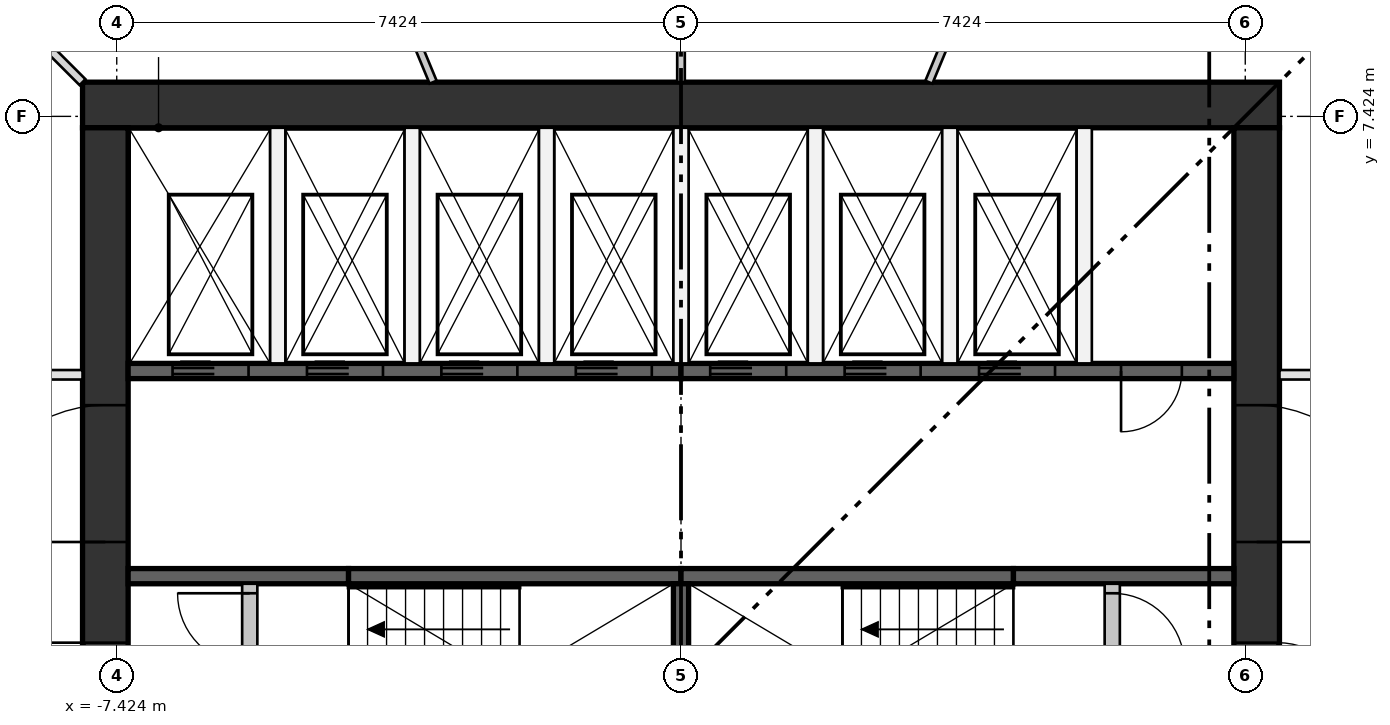
"""IFC4 building model, lengths in metres.
Left out: names, types, materials, properties, quantities, classifications, styles, units other than length and angle.
Written with IfcOpenShell. Run it as: python <this file> out.ifc"""

import sys

from ifc_helpers import new_model, si_unit, direction, frame, frame_2d, origin, place, context, subcontext, project, spatial, rectangle, extrude, element, fill, save


model = new_model("IFC4")
c1 = context("Model", 3, precision=1e-05, world=origin(), true_north=direction((0.0, 1.0)))
c2 = subcontext(c1, "Body", "Model", "MODEL_VIEW")
j1 = project(units=[si_unit("LENGTHUNIT", "METRE"), si_unit("PLANEANGLEUNIT", "RADIAN")], contexts=[c1])
p1 = place(None, origin())
s1 = spatial("IfcSite", under=j1, at=p1, CompositionType="ELEMENT")
p2 = place(p1, origin())
s2 = spatial("IfcBuilding", under=s1, at=p2, CompositionType="ELEMENT")
p3 = place(p2, frame((0.0, 0.0, 127.65)))
s3 = spatial("IfcBuildingStorey", under=s2, at=p3, CompositionType="ELEMENT", Elevation=127.65)
p4 = place(p3, frame((-7.874, 7.574, 0.0), z_axis=(0.0, 0.0, 1.0), x_axis=(1.0, 0.0, 0.0)))
e1 = element("IfcWall", 1, at=p4, inside=s3, PredefinedType="SHEAR", context=c2, shape_type="SweptSolid", body=[
    extrude(rectangle(XDim=15.748, YDim=0.6, at=frame_2d((7.874, 0.0))), origin(), (0.0, 0.0, 1.0), 3.35),
])
p5 = place(p3, frame((-7.574, -7.274, 0.0), z_axis=(0.0, 0.0, 1.0), x_axis=(0.0, 1.0, 0.0)))
e2 = element("IfcWall", 2, at=p5, inside=s3, PredefinedType="SHEAR", context=c2, shape_type="SweptSolid", body=[
    extrude(rectangle(XDim=14.548, YDim=0.6, at=frame_2d((7.274, 0.0))), origin(), (0.0, 0.0, 1.0), 3.35),
])
p6 = place(p5, frame((6.774, 0.0, 0.0)))
e3 = element("IfcOpeningElement", 3, at=p6, cuts=e2, PredefinedType="OPENING", context=c2, shape_type="SweptSolid", body=[
    extrude(rectangle(XDim=1.0, YDim=2.1, at=frame_2d((0.5, 1.05))), frame((0.0, 0.31, 0.0), z_axis=(0.0, -1.0, 0.0), x_axis=(1.0, 0.0, 0.0)), (0.0, 0.0, 1.0), 0.62),
])
p7 = place(p5, frame((3.649, 0.0, 0.0)))
e4 = element("IfcOpeningElement", 4, at=p7, cuts=e2, PredefinedType="OPENING", context=c2, shape_type="SweptSolid", body=[
    extrude(rectangle(XDim=1.8, YDim=2.1, at=frame_2d((0.9, 1.05))), frame((0.0, 0.31, 0.0), z_axis=(0.0, -1.0, 0.0), x_axis=(1.0, 0.0, 0.0)), (0.0, 0.0, 1.0), 0.62),
])
p8 = place(p5, frame((9.098, 0.0, 0.0)))
e5 = element("IfcOpeningElement", 5, at=p8, cuts=e2, PredefinedType="OPENING", context=c2, shape_type="SweptSolid", body=[
    extrude(rectangle(XDim=1.8, YDim=2.1, at=frame_2d((0.9, 1.05))), frame((0.0, 0.31, 0.0), z_axis=(0.0, -1.0, 0.0), x_axis=(1.0, 0.0, 0.0)), (0.0, 0.0, 1.0), 0.62),
])
p9 = place(p3, frame((7.574, -7.274, 0.0), z_axis=(0.0, 0.0, 1.0), x_axis=(0.0, 1.0, 0.0)))
e6 = element("IfcWall", 6, at=p9, inside=s3, PredefinedType="SHEAR", context=c2, shape_type="SweptSolid", body=[
    extrude(rectangle(XDim=14.548, YDim=0.6, at=frame_2d((7.274, 0.0))), origin(), (0.0, 0.0, 1.0), 3.35),
])
p10 = place(p9, frame((6.774, 0.0, 0.0)))
e7 = element("IfcOpeningElement", 7, at=p10, cuts=e6, PredefinedType="OPENING", context=c2, shape_type="SweptSolid", body=[
    extrude(rectangle(XDim=1.0, YDim=2.1, at=frame_2d((0.5, 1.05))), frame((0.0, 0.31, 0.0), z_axis=(0.0, -1.0, 0.0), x_axis=(1.0, 0.0, 0.0)), (0.0, 0.0, 1.0), 0.62),
])
p11 = place(p9, frame((3.649, 0.0, 0.0)))
e8 = element("IfcOpeningElement", 8, at=p11, cuts=e6, PredefinedType="OPENING", context=c2, shape_type="SweptSolid", body=[
    extrude(rectangle(XDim=1.8, YDim=2.1, at=frame_2d((0.9, 1.05))), frame((0.0, 0.31, 0.0), z_axis=(0.0, -1.0, 0.0), x_axis=(1.0, 0.0, 0.0)), (0.0, 0.0, 1.0), 0.62),
])
p12 = place(p9, frame((9.098, 0.0, 0.0)))
e9 = element("IfcOpeningElement", 9, at=p12, cuts=e6, PredefinedType="OPENING", context=c2, shape_type="SweptSolid", body=[
    extrude(rectangle(XDim=1.8, YDim=2.1, at=frame_2d((0.9, 1.05))), frame((0.0, 0.31, 0.0), z_axis=(0.0, -1.0, 0.0), x_axis=(1.0, 0.0, 0.0)), (0.0, 0.0, 1.0), 0.62),
])
p13 = place(p3, frame((-7.274, 4.074, 0.0), z_axis=(0.0, 0.0, 1.0), x_axis=(1.0, 0.0, 0.0)))
e10 = element("IfcWall", 10, at=p13, inside=s3, PredefinedType="SHEAR", context=c2, shape_type="SweptSolid", body=[
    extrude(rectangle(XDim=7.274, YDim=0.2, at=frame_2d((3.637, 0.0))), origin(), (0.0, 0.0, 1.0), 3.0),
])
p14 = place(p13, frame((0.584, 0.0, 0.0)))
e11 = element("IfcOpeningElement", 11, at=p14, cuts=e10, PredefinedType="OPENING", context=c2, shape_type="SweptSolid", body=[
    extrude(rectangle(XDim=1.0, YDim=2.1, at=frame_2d((0.5, 1.05))), frame((0.0, 0.11, 0.0), z_axis=(0.0, -1.0, 0.0), x_axis=(1.0, 0.0, 0.0)), (0.0, 0.0, 1.0), 0.22),
])
p15 = place(p13, frame((2.353, 0.0, 0.0)))
e12 = element("IfcOpeningElement", 12, at=p15, cuts=e10, PredefinedType="OPENING", context=c2, shape_type="SweptSolid", body=[
    extrude(rectangle(XDim=1.0, YDim=2.1, at=frame_2d((0.5, 1.05))), frame((0.0, 0.11, 0.0), z_axis=(0.0, -1.0, 0.0), x_axis=(1.0, 0.0, 0.0)), (0.0, 0.0, 1.0), 0.22),
])
p16 = place(p13, frame((4.121, 0.0, 0.0)))
e13 = element("IfcOpeningElement", 13, at=p16, cuts=e10, PredefinedType="OPENING", context=c2, shape_type="SweptSolid", body=[
    extrude(rectangle(XDim=1.0, YDim=2.1, at=frame_2d((0.5, 1.05))), frame((0.0, 0.11, 0.0), z_axis=(0.0, -1.0, 0.0), x_axis=(1.0, 0.0, 0.0)), (0.0, 0.0, 1.0), 0.22),
])
p17 = place(p13, frame((5.89, 0.0, 0.0)))
e14 = element("IfcOpeningElement", 14, at=p17, cuts=e10, PredefinedType="OPENING", context=c2, shape_type="SweptSolid", body=[
    extrude(rectangle(XDim=1.0, YDim=2.1, at=frame_2d((0.5, 1.05))), frame((0.0, 0.11, 0.0), z_axis=(0.0, -1.0, 0.0), x_axis=(1.0, 0.0, 0.0)), (0.0, 0.0, 1.0), 0.22),
])
p18 = place(p3, frame((0.0, 4.074, 0.0), z_axis=(0.0, 0.0, 1.0), x_axis=(1.0, 0.0, 0.0)))
e15 = element("IfcWall", 15, at=p18, inside=s3, PredefinedType="SHEAR", context=c2, shape_type="SweptSolid", body=[
    extrude(rectangle(XDim=7.274, YDim=0.2, at=frame_2d((3.637, 0.0))), origin(), (0.0, 0.0, 1.0), 3.0),
])
p19 = place(p18, frame((0.384, 0.0, 0.0)))
e16 = element("IfcOpeningElement", 16, at=p19, cuts=e15, PredefinedType="OPENING", context=c2, shape_type="SweptSolid", body=[
    extrude(rectangle(XDim=1.0, YDim=2.1, at=frame_2d((0.5, 1.05))), frame((0.0, 0.11, 0.0), z_axis=(0.0, -1.0, 0.0), x_axis=(1.0, 0.0, 0.0)), (0.0, 0.0, 1.0), 0.22),
])
p20 = place(p18, frame((2.153, 0.0, 0.0)))
e17 = element("IfcOpeningElement", 17, at=p20, cuts=e15, PredefinedType="OPENING", context=c2, shape_type="SweptSolid", body=[
    extrude(rectangle(XDim=1.0, YDim=2.1, at=frame_2d((0.5, 1.05))), frame((0.0, 0.11, 0.0), z_axis=(0.0, -1.0, 0.0), x_axis=(1.0, 0.0, 0.0)), (0.0, 0.0, 1.0), 0.22),
])
p21 = place(p18, frame((3.921, 0.0, 0.0)))
e18 = element("IfcOpeningElement", 18, at=p21, cuts=e15, PredefinedType="OPENING", context=c2, shape_type="SweptSolid", body=[
    extrude(rectangle(XDim=1.0, YDim=2.1, at=frame_2d((0.5, 1.05))), frame((0.0, 0.11, 0.0), z_axis=(0.0, -1.0, 0.0), x_axis=(1.0, 0.0, 0.0)), (0.0, 0.0, 1.0), 0.22),
])
p22 = place(p18, frame((5.79, 0.0, 0.0)))
e19 = element("IfcOpeningElement", 19, at=p22, cuts=e15, PredefinedType="OPENING", context=c2, shape_type="SweptSolid", body=[
    extrude(rectangle(XDim=0.8, YDim=2.1, at=frame_2d((0.4, 1.05))), frame((0.0, 0.11, 0.0), z_axis=(0.0, -1.0, 0.0), x_axis=(1.0, 0.0, 0.0)), (0.0, 0.0, 1.0), 0.22),
])
p23 = place(p3, frame((-7.274, 1.375, 0.0), z_axis=(0.0, 0.0, 1.0), x_axis=(1.0, 0.0, 0.0)))
e20 = element("IfcWall", 20, at=p23, inside=s3, PredefinedType="SHEAR", context=c2, shape_type="SweptSolid", body=[
    extrude(rectangle(XDim=2.9, YDim=0.2, at=frame_2d((1.45, 0.0))), origin(), (0.0, 0.0, 1.0), 3.0),
])
for number, where, z_axis, x_axis in (
    (21, (-4.374, 1.375, 0.0), (0.0, 0.0, 1.0), (1.0, 0.0, 0.0)),
    (22, (0.0, 1.375, 0.0), (0.0, 0.0, 1.0), (1.0, 0.0, 0.0)),
):
    element("IfcWall", number, at=place(p3, frame(where, z_axis=z_axis, x_axis=x_axis)), inside=s3, PredefinedType="SHEAR", context=c2, shape_type="SweptSolid", body=[
        extrude(rectangle(XDim=4.374, YDim=0.2, at=frame_2d((2.187, 0.0))), origin(), (0.0, 0.0, 1.0), 3.0),
    ])
p24 = place(p3, frame((4.374, 1.375, 0.0), z_axis=(0.0, 0.0, 1.0), x_axis=(1.0, 0.0, 0.0)))
e23 = element("IfcWall", 23, at=p24, inside=s3, PredefinedType="SHEAR", context=c2, shape_type="SweptSolid", body=[
    extrude(rectangle(XDim=2.9, YDim=0.2, at=frame_2d((1.45, 0.0))), origin(), (0.0, 0.0, 1.0), 3.0),
])
p25 = place(p3, frame((0.0, -1.275, 0.0), z_axis=(0.0, 0.0, 1.0), x_axis=(0.0, 1.0, 0.0)))
e24 = element("IfcWall", 24, at=p25, inside=s3, PredefinedType="SHEAR", context=c2, shape_type="SweptSolid", body=[
    extrude(rectangle(XDim=2.55, YDim=0.2, at=frame_2d((1.275, 0.0))), origin(), (0.0, 0.0, 1.0), 3.0),
])
for number, where, z_axis, x_axis in (
    (25, (-5.305, 4.174, 0.0), (0.0, 0.0, 1.0), (0.0, 1.0, 0.0)),
    (26, (-3.537, 4.174, 0.0), (0.0, 0.0, 1.0), (0.0, 1.0, 0.0)),
    (27, (-1.769, 4.174, 0.0), (0.0, 0.0, 1.0), (0.0, 1.0, 0.0)),
    (28, (0.0, 4.174, 0.0), (0.0, 0.0, 1.0), (0.0, 1.0, 0.0)),
    (29, (1.769, 4.174, 0.0), (0.0, 0.0, 1.0), (0.0, 1.0, 0.0)),
    (30, (3.537, 4.174, 0.0), (0.0, 0.0, 1.0), (0.0, 1.0, 0.0)),
    (31, (5.305, 4.174, 0.0), (0.0, 0.0, 1.0), (0.0, 1.0, 0.0)),
):
    element("IfcWall", number, at=place(p3, frame(where, z_axis=z_axis, x_axis=x_axis)), inside=s3, PredefinedType="PARTITIONING", context=c2, shape_type="SweptSolid", body=[
        extrude(rectangle(XDim=3.1, YDim=0.2, at=frame_2d((1.55, 0.0))), origin(), (0.0, 0.0, 1.0), 3.0),
    ])
p26 = place(p3, frame((-5.674, -1.275, 0.0), z_axis=(0.0, 0.0, 1.0), x_axis=(0.0, 1.0, 0.0)))
e32 = element("IfcWall", 32, at=p26, inside=s3, PredefinedType="PARTITIONING", context=c2, shape_type="SweptSolid", body=[
    extrude(rectangle(XDim=2.55, YDim=0.2, at=frame_2d((1.275, 0.0))), origin(), (0.0, 0.0, 1.0), 3.0),
])
p27 = place(p26, frame((0.125, 0.0, 0.0)))
e33 = element("IfcOpeningElement", 33, at=p27, cuts=e32, PredefinedType="OPENING", context=c2, shape_type="SweptSolid", body=[
    extrude(rectangle(XDim=0.95, YDim=2.1, at=frame_2d((0.475, 1.05))), frame((0.0, 0.11, 0.0), z_axis=(0.0, -1.0, 0.0), x_axis=(1.0, 0.0, 0.0)), (0.0, 0.0, 1.0), 0.22),
])
p28 = place(p26, frame((1.475, 0.0, 0.0)))
e34 = element("IfcOpeningElement", 34, at=p28, cuts=e32, PredefinedType="OPENING", context=c2, shape_type="SweptSolid", body=[
    extrude(rectangle(XDim=0.95, YDim=2.1, at=frame_2d((0.475, 1.05))), frame((0.0, 0.11, 0.0), z_axis=(0.0, -1.0, 0.0), x_axis=(1.0, 0.0, 0.0)), (0.0, 0.0, 1.0), 0.22),
])
p29 = place(p3, frame((5.674, -1.275, 0.0), z_axis=(0.0, 0.0, 1.0), x_axis=(0.0, 1.0, 0.0)))
e35 = element("IfcWall", 35, at=p29, inside=s3, PredefinedType="PARTITIONING", context=c2, shape_type="SweptSolid", body=[
    extrude(rectangle(XDim=2.55, YDim=0.2, at=frame_2d((1.275, 0.0))), origin(), (0.0, 0.0, 1.0), 3.0),
])
p30 = place(p29, frame((0.125, 0.0, 0.0)))
e36 = element("IfcOpeningElement", 36, at=p30, cuts=e35, PredefinedType="OPENING", context=c2, shape_type="SweptSolid", body=[
    extrude(rectangle(XDim=0.95, YDim=2.1, at=frame_2d((0.475, 1.05))), frame((0.0, 0.11, 0.0), z_axis=(0.0, -1.0, 0.0), x_axis=(1.0, 0.0, 0.0)), (0.0, 0.0, 1.0), 0.22),
])
p31 = place(p29, frame((1.475, 0.0, 0.0)))
e37 = element("IfcOpeningElement", 37, at=p31, cuts=e35, PredefinedType="OPENING", context=c2, shape_type="SweptSolid", body=[
    extrude(rectangle(XDim=0.95, YDim=2.1, at=frame_2d((0.475, 1.05))), frame((0.0, 0.11, 0.0), z_axis=(0.0, -1.0, 0.0), x_axis=(1.0, 0.0, 0.0)), (0.0, 0.0, 1.0), 0.22),
])
p32 = place(p3, frame((7.874, 4.024, 0.0), z_axis=(0.0, 0.0, 1.0), x_axis=(1.0, 0.0, 0.0)))
e38 = element("IfcWall", 38, at=p32, inside=s3, PredefinedType="PARTITIONING", context=c2, shape_type="SweptSolid", body=[
    extrude(rectangle(XDim=5.384, YDim=0.125, at=frame_2d((2.692, 0.0))), origin(), (0.0, 0.0, 1.0), 3.0),
])
p33 = place(p32, frame((1.8, 0.0, 0.0)))
e39 = element("IfcOpeningElement", 39, at=p33, cuts=e38, PredefinedType="OPENING", context=c2, shape_type="SweptSolid", body=[
    extrude(rectangle(XDim=1.8, YDim=2.1, at=frame_2d((0.9, 1.05))), frame((0.0, 0.073, 0.0), z_axis=(0.0, -1.0, 0.0), x_axis=(1.0, 0.0, 0.0)), (0.0, 0.0, 1.0), 0.145),
])
p34 = place(p3, frame((-13.784, 4.024, 0.0), z_axis=(0.0, 0.0, 1.0), x_axis=(1.0, 0.0, 0.0)))
e40 = element("IfcWall", 40, at=p34, inside=s3, PredefinedType="PARTITIONING", context=c2, shape_type="SweptSolid", body=[
    extrude(rectangle(XDim=5.91, YDim=0.125, at=frame_2d((2.955, 0.0))), origin(), (0.0, 0.0, 1.0), 3.0),
])
p35 = place(p34, frame((2.5, 0.0, 0.0)))
e41 = element("IfcOpeningElement", 41, at=p35, cuts=e40, PredefinedType="OPENING", context=c2, shape_type="SweptSolid", body=[
    extrude(rectangle(XDim=1.0, YDim=2.1, at=frame_2d((0.5, 1.05))), frame((0.0, 0.073, 0.0), z_axis=(0.0, -1.0, 0.0), x_axis=(1.0, 0.0, 0.0)), (0.0, 0.0, 1.0), 0.145),
])
p36 = place(p3, frame((3.261, 7.874, 0.0), z_axis=(0.0, 0.0, 1.0), x_axis=(0.382689326263, 0.923877091157, 0.0)))
e42 = element("IfcWall", 42, at=p36, inside=s3, PredefinedType="PARTITIONING", context=c2, shape_type="SweptSolid", body=[
    extrude(rectangle(XDim=6.537, YDim=0.1, at=frame_2d((3.269, 0.0))), origin(), (0.0, 0.0, 1.0), 3.0),
])
p37 = place(p36, frame((2.8, 0.0, 0.0)))
e43 = element("IfcOpeningElement", 43, at=p37, cuts=e42, PredefinedType="OPENING", context=c2, shape_type="SweptSolid", body=[
    extrude(rectangle(XDim=1.0, YDim=2.1, at=frame_2d((0.5, 1.05))), frame((0.0, 0.06, 0.0), z_axis=(0.0, -1.0, 0.0), x_axis=(1.0, 0.0, 0.0)), (0.0, 0.0, 1.0), 0.12),
])
p38 = place(p3, frame((0.0, 7.874, 0.0), z_axis=(0.0, 0.0, 1.0), x_axis=(0.0, 1.0, 0.0)))
e44 = element("IfcWall", 44, at=p38, inside=s3, PredefinedType="PARTITIONING", context=c2, shape_type="SweptSolid", body=[
    extrude(rectangle(XDim=7.186, YDim=0.1, at=frame_2d((3.593, 0.0))), origin(), (0.0, 0.0, 1.0), 3.0),
])
p39 = place(p38, frame((3.1, 0.0, 0.0)))
e45 = element("IfcOpeningElement", 45, at=p39, cuts=e44, PredefinedType="OPENING", context=c2, shape_type="SweptSolid", body=[
    extrude(rectangle(XDim=1.0, YDim=2.1, at=frame_2d((0.5, 1.05))), frame((0.0, 0.06, 0.0), z_axis=(0.0, -1.0, 0.0), x_axis=(1.0, 0.0, 0.0)), (0.0, 0.0, 1.0), 0.12),
])
p40 = place(p3, frame((-3.261, 7.874, 0.0), z_axis=(0.0, 0.0, 1.0), x_axis=(-0.382689326263, 0.923877091157, 0.0)))
e46 = element("IfcWall", 46, at=p40, inside=s3, PredefinedType="PARTITIONING", context=c2, shape_type="SweptSolid", body=[
    extrude(rectangle(XDim=6.537, YDim=0.1, at=frame_2d((3.269, 0.0))), origin(), (0.0, 0.0, 1.0), 3.0),
])
p41 = place(p40, frame((2.8, 0.0, 0.0)))
e47 = element("IfcOpeningElement", 47, at=p41, cuts=e46, PredefinedType="OPENING", context=c2, shape_type="SweptSolid", body=[
    extrude(rectangle(XDim=1.0, YDim=2.1, at=frame_2d((0.5, 1.05))), frame((0.0, 0.06, 0.0), z_axis=(0.0, -1.0, 0.0), x_axis=(1.0, 0.0, 0.0)), (0.0, 0.0, 1.0), 0.12),
])
p42 = place(p3, frame((-7.874, 7.874, 0.0), z_axis=(0.0, 0.0, 1.0), x_axis=(-0.707106781187, 0.707106781187, 0.0)))
e48 = element("IfcWall", 48, at=p42, inside=s3, PredefinedType="PARTITIONING", context=c2, shape_type="SweptSolid", body=[
    extrude(rectangle(XDim=6.794, YDim=0.11, at=frame_2d((3.397, 0.0))), origin(), (0.0, 0.0, 1.0), 3.0),
])
p43 = place(p14, frame((1.0, 0.0, 0.0), z_axis=(0.0, 0.0, 1.0), x_axis=(-1.0, 0.0, 0.0)))
e49 = element("IfcDoor", 49, at=p43, inside=s3, OperationType="DOUBLE_DOOR_SLIDING", PredefinedType="DOOR", context=c2, shape_type="SweptSolid", body=[
    extrude(rectangle(XDim=1.0, YDim=2.1, at=frame_2d((0.5, 1.05))), frame((0.0, 0.025, 0.0), z_axis=(0.0, -1.0, 0.0), x_axis=(1.0, 0.0, 0.0)), (0.0, 0.0, 1.0), 0.05),
])
fill(e11, e49)
p44 = place(p15, frame((1.0, 0.0, 0.0), z_axis=(0.0, 0.0, 1.0), x_axis=(-1.0, 0.0, 0.0)))
e50 = element("IfcDoor", 50, at=p44, inside=s3, OperationType="DOUBLE_DOOR_SLIDING", PredefinedType="DOOR", context=c2, shape_type="SweptSolid", body=[
    extrude(rectangle(XDim=1.0, YDim=2.1, at=frame_2d((0.5, 1.05))), frame((0.0, 0.025, 0.0), z_axis=(0.0, -1.0, 0.0), x_axis=(1.0, 0.0, 0.0)), (0.0, 0.0, 1.0), 0.05),
])
fill(e12, e50)
p45 = place(p16, frame((1.0, 0.0, 0.0), z_axis=(0.0, 0.0, 1.0), x_axis=(-1.0, 0.0, 0.0)))
e51 = element("IfcDoor", 51, at=p45, inside=s3, OperationType="DOUBLE_DOOR_SLIDING", PredefinedType="DOOR", context=c2, shape_type="SweptSolid", body=[
    extrude(rectangle(XDim=1.0, YDim=2.1, at=frame_2d((0.5, 1.05))), frame((0.0, 0.025, 0.0), z_axis=(0.0, -1.0, 0.0), x_axis=(1.0, 0.0, 0.0)), (0.0, 0.0, 1.0), 0.05),
])
fill(e13, e51)
p46 = place(p17, frame((1.0, 0.0, 0.0), z_axis=(0.0, 0.0, 1.0), x_axis=(-1.0, 0.0, 0.0)))
e52 = element("IfcDoor", 52, at=p46, inside=s3, OperationType="DOUBLE_DOOR_SLIDING", PredefinedType="DOOR", context=c2, shape_type="SweptSolid", body=[
    extrude(rectangle(XDim=1.0, YDim=2.1, at=frame_2d((0.5, 1.05))), frame((0.0, 0.025, 0.0), z_axis=(0.0, -1.0, 0.0), x_axis=(1.0, 0.0, 0.0)), (0.0, 0.0, 1.0), 0.05),
])
fill(e14, e52)
p47 = place(p19, frame((1.0, 0.0, 0.0), z_axis=(0.0, 0.0, 1.0), x_axis=(-1.0, 0.0, 0.0)))
e53 = element("IfcDoor", 53, at=p47, inside=s3, OperationType="DOUBLE_DOOR_SLIDING", PredefinedType="DOOR", context=c2, shape_type="SweptSolid", body=[
    extrude(rectangle(XDim=1.0, YDim=2.1, at=frame_2d((0.5, 1.05))), frame((0.0, 0.025, 0.0), z_axis=(0.0, -1.0, 0.0), x_axis=(1.0, 0.0, 0.0)), (0.0, 0.0, 1.0), 0.05),
])
fill(e16, e53)
p48 = place(p20, frame((1.0, 0.0, 0.0), z_axis=(0.0, 0.0, 1.0), x_axis=(-1.0, 0.0, 0.0)))
e54 = element("IfcDoor", 54, at=p48, inside=s3, OperationType="DOUBLE_DOOR_SLIDING", PredefinedType="DOOR", context=c2, shape_type="SweptSolid", body=[
    extrude(rectangle(XDim=1.0, YDim=2.1, at=frame_2d((0.5, 1.05))), frame((0.0, 0.025, 0.0), z_axis=(0.0, -1.0, 0.0), x_axis=(1.0, 0.0, 0.0)), (0.0, 0.0, 1.0), 0.05),
])
fill(e17, e54)
p49 = place(p21, frame((1.0, 0.0, 0.0), z_axis=(0.0, 0.0, 1.0), x_axis=(-1.0, 0.0, 0.0)))
e55 = element("IfcDoor", 55, at=p49, inside=s3, OperationType="DOUBLE_DOOR_SLIDING", PredefinedType="DOOR", context=c2, shape_type="SweptSolid", body=[
    extrude(rectangle(XDim=1.0, YDim=2.1, at=frame_2d((0.5, 1.05))), frame((0.0, 0.025, 0.0), z_axis=(0.0, -1.0, 0.0), x_axis=(1.0, 0.0, 0.0)), (0.0, 0.0, 1.0), 0.05),
])
fill(e18, e55)
p50 = place(p28, origin())
e56 = element("IfcDoor", 56, at=p50, inside=s3, OperationType="SINGLE_SWING_RIGHT", PredefinedType="DOOR", context=c2, shape_type="SweptSolid", body=[
    extrude(rectangle(XDim=0.95, YDim=2.1, at=frame_2d((0.475, 1.05))), frame((0.0, 0.025, 0.0), z_axis=(0.0, -1.0, 0.0), x_axis=(1.0, 0.0, 0.0)), (0.0, 0.0, 1.0), 0.05),
])
fill(e34, e56)
p51 = place(p31, frame((0.95, 0.0, 0.0), z_axis=(0.0, 0.0, 1.0), x_axis=(-1.0, 0.0, 0.0)))
e57 = element("IfcDoor", 57, at=p51, inside=s3, OperationType="SINGLE_SWING_LEFT", PredefinedType="DOOR", context=c2, shape_type="SweptSolid", body=[
    extrude(rectangle(XDim=0.95, YDim=2.1, at=frame_2d((0.475, 1.05))), frame((0.0, 0.025, 0.0), z_axis=(0.0, -1.0, 0.0), x_axis=(1.0, 0.0, 0.0)), (0.0, 0.0, 1.0), 0.05),
])
fill(e37, e57)
p52 = place(p22, frame((0.8, 0.0, 0.0), z_axis=(0.0, 0.0, 1.0), x_axis=(-1.0, 0.0, 0.0)))
e58 = element("IfcDoor", 58, at=p52, inside=s3, OperationType="SINGLE_SWING_LEFT", PredefinedType="DOOR", context=c2, shape_type="SweptSolid", body=[
    extrude(rectangle(XDim=0.8, YDim=2.1, at=frame_2d((0.4, 1.05))), frame((0.0, 0.025, 0.0), z_axis=(0.0, -1.0, 0.0), x_axis=(1.0, 0.0, 0.0)), (0.0, 0.0, 1.0), 0.05),
])
fill(e19, e58)
p53 = place(p6, origin())
e59 = element("IfcDoor", 59, at=p53, inside=s3, OperationType="SINGLE_SWING_RIGHT", PredefinedType="DOOR", context=c2, shape_type="SweptSolid", body=[
    extrude(rectangle(XDim=1.0, YDim=2.1, at=frame_2d((0.5, 1.05))), frame((0.0, 0.3, 0.0), z_axis=(0.0, -1.0, 0.0), x_axis=(1.0, 0.0, 0.0)), (0.0, 0.0, 1.0), 0.05),
])
fill(e3, e59)
p54 = place(p8, origin())
e60 = element("IfcDoor", 60, at=p54, inside=s3, OperationType="DOUBLE_DOOR_SINGLE_SWING", PredefinedType="DOOR", context=c2, shape_type="SweptSolid", body=[
    extrude(rectangle(XDim=1.8, YDim=2.1, at=frame_2d((0.9, 1.05))), frame((0.0, 0.025, 0.0), z_axis=(0.0, -1.0, 0.0), x_axis=(1.0, 0.0, 0.0)), (0.0, 0.0, 1.0), 0.05),
])
fill(e5, e60)
p55 = place(p10, frame((1.0, 0.0, 0.0), z_axis=(0.0, 0.0, 1.0), x_axis=(-1.0, 0.0, 0.0)))
e61 = element("IfcDoor", 61, at=p55, inside=s3, OperationType="SINGLE_SWING_LEFT", PredefinedType="DOOR", context=c2, shape_type="SweptSolid", body=[
    extrude(rectangle(XDim=1.0, YDim=2.1, at=frame_2d((0.5, 1.05))), frame((0.0, 0.3, 0.0), z_axis=(0.0, -1.0, 0.0), x_axis=(1.0, 0.0, 0.0)), (0.0, 0.0, 1.0), 0.05),
])
fill(e7, e61)
p56 = place(p12, frame((1.8, 0.0, 0.0), z_axis=(0.0, 0.0, 1.0), x_axis=(-1.0, 0.0, 0.0)))
e62 = element("IfcDoor", 62, at=p56, inside=s3, OperationType="DOUBLE_DOOR_SINGLE_SWING", PredefinedType="DOOR", context=c2, shape_type="SweptSolid", body=[
    extrude(rectangle(XDim=1.8, YDim=2.1, at=frame_2d((0.9, 1.05))), frame((0.0, 0.025, 0.0), z_axis=(0.0, -1.0, 0.0), x_axis=(1.0, 0.0, 0.0)), (0.0, 0.0, 1.0), 0.05),
])
fill(e9, e62)
save(model, sys.argv[1])
